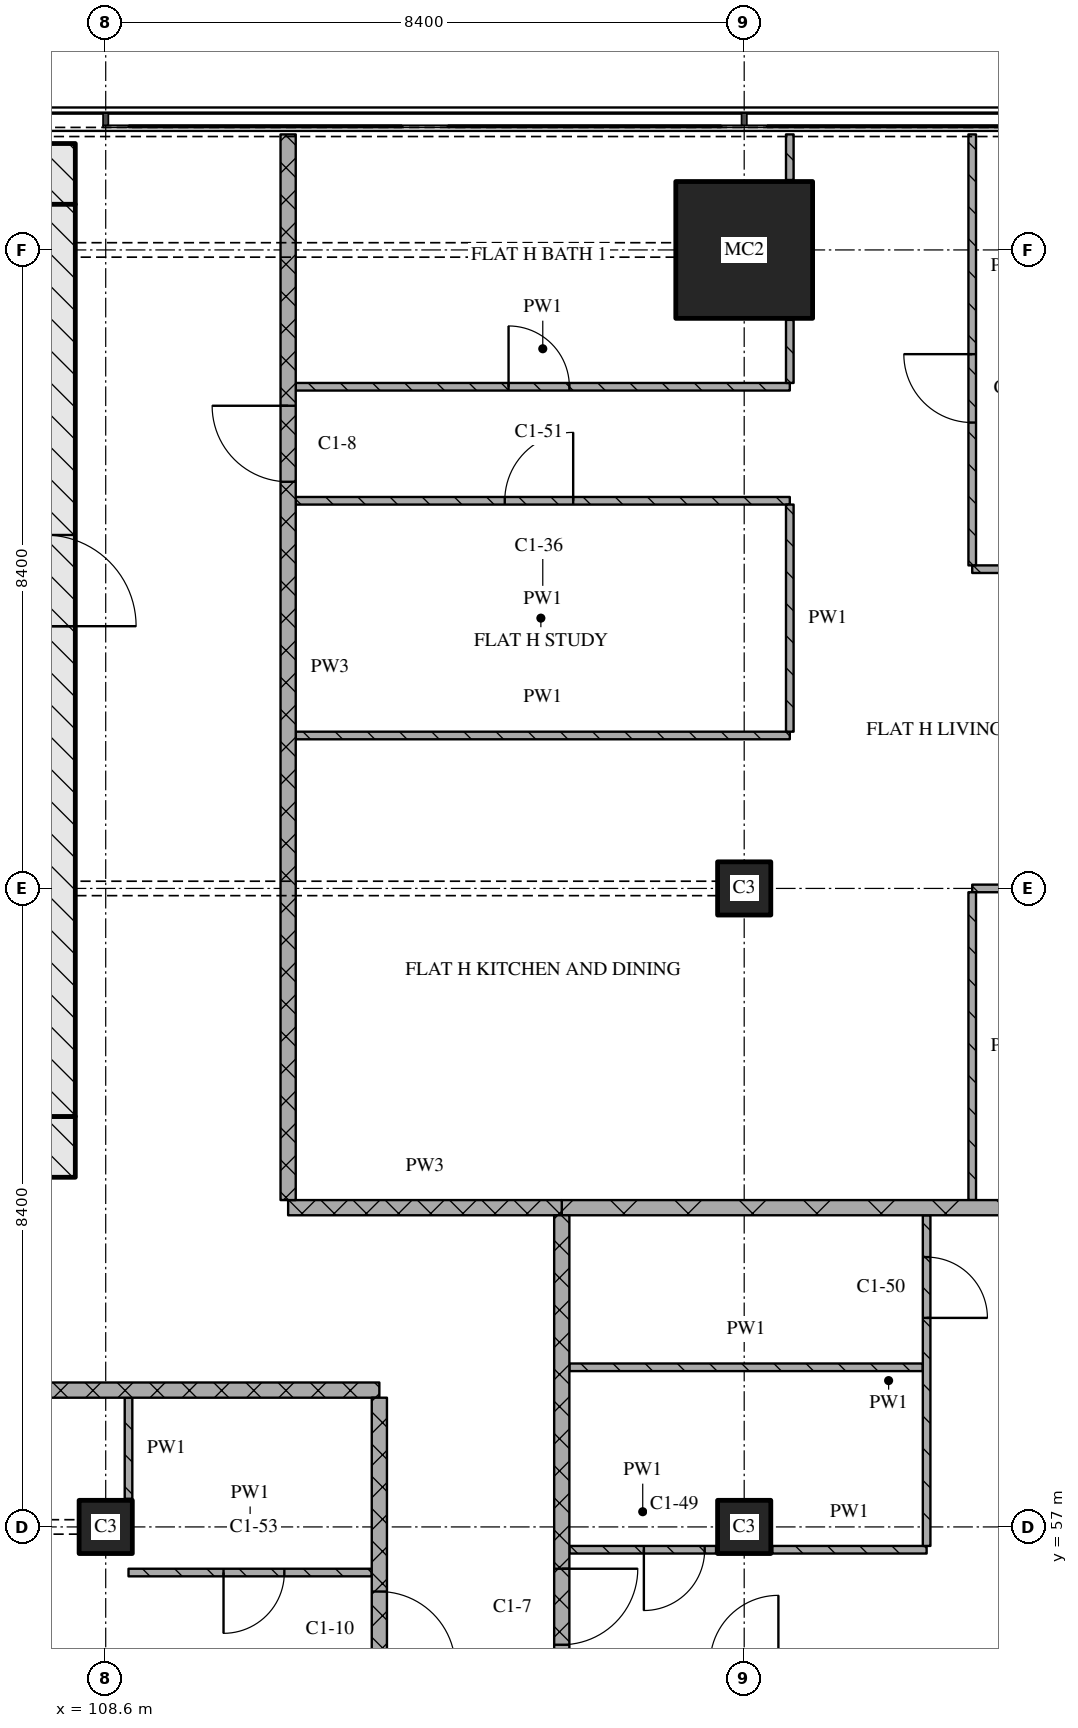
"""IFC4 building model, lengths in metres.
Left out: names, types, materials, properties, quantities, classifications, styles, units other than length and angle.
Written with IfcOpenShell. Run it as: python <this file> out.ifc"""

import sys

from ifc_helpers import new_model, si_unit, direction, frame, frame_2d, origin, origin_2d, place, context, subcontext, project, spatial, rectangle, extrude, element, fill, save


model = new_model("IFC4")
c1 = context("Model", 3, precision=1e-05, world=origin(), true_north=direction((0.0, 1.0)))
c2 = subcontext(c1, "Body", "Model", "MODEL_VIEW")
j1 = project(units=[si_unit("LENGTHUNIT", "METRE"), si_unit("PLANEANGLEUNIT", "RADIAN")], contexts=[c1])
p1 = place(None, origin())
s1 = spatial("IfcSite", under=j1, at=p1, CompositionType="ELEMENT")
p2 = place(p1, origin())
s2 = spatial("IfcBuilding", under=s1, at=p2, CompositionType="ELEMENT")
p3 = place(p2, frame((0.0, 0.0, 151.05)))
s3 = spatial("IfcBuildingStorey", under=s2, at=p3, CompositionType="ELEMENT", Elevation=151.05)
for number, where, z_axis, x_axis in (
    (1, (108.6, 57.0, 0.0), (0.0, 0.0, 1.0), (1.0, 0.0, 0.0)),
    (2, (117.0, 57.0, 0.0), (0.0, 0.0, 1.0), (1.0, 0.0, 0.0)),
    (3, (117.0, 65.4, 0.0), (0.0, 0.0, 1.0), (1.0, 0.0, 0.0)),
):
    element("IfcColumn", number, at=place(p3, frame(where, z_axis=z_axis, x_axis=x_axis)), inside=s3, PredefinedType="COLUMN", context=c2, shape_type="SweptSolid", body=[
        extrude(rectangle(XDim=0.7, YDim=0.7, at=origin_2d()), origin(), (0.0, 0.0, 1.0), 3.6),
    ])
p4 = place(p3, frame((117.0, 73.8, 0.0), z_axis=(0.0, 0.0, 1.0), x_axis=(1.0, 0.0, 0.0)))
e4 = element("IfcColumn", 4, at=p4, inside=s3, PredefinedType="COLUMN", context=c2, shape_type="SweptSolid", body=[
    extrude(rectangle(XDim=1.8, YDim=1.8, at=origin_2d()), origin(), (0.0, 0.0, 1.0), 3.6),
])
p5 = place(p3, frame((67.0, 62.0, 0.0), z_axis=(0.0, 0.0, 1.0), x_axis=(1.0, 0.0, 0.0)))
e5 = element("IfcWall", 5, at=p5, inside=s3, PredefinedType="SOLIDWALL", context=c2, shape_type="SweptSolid", body=[
    extrude(rectangle(XDim=41.2, YDim=0.8, at=frame_2d((20.6, 0.0))), origin(), (0.0, 0.0, 1.0), 3.32),
])
p6 = place(p5, frame((20.95, 0.0, 0.0)))
e6 = element("IfcOpeningElement", 6, at=p6, cuts=e5, PredefinedType="OPENING", context=c2, shape_type="SweptSolid", body=[
    extrude(rectangle(XDim=1.8, YDim=2.1, at=frame_2d((0.9, 1.05))), frame((0.0, 0.41, 0.0), z_axis=(0.0, -1.0, 0.0), x_axis=(1.0, 0.0, 0.0)), (0.0, 0.0, 1.0), 0.82),
])
p7 = place(p3, frame((67.0, 74.8, 0.0), z_axis=(0.0, 0.0, 1.0), x_axis=(1.0, 0.0, 0.0)))
e7 = element("IfcWall", 7, at=p7, inside=s3, PredefinedType="SOLIDWALL", context=c2, shape_type="SweptSolid", body=[
    extrude(rectangle(XDim=41.2, YDim=0.8, at=frame_2d((20.6, 0.0))), origin(), (0.0, 0.0, 1.0), 3.32),
])
p8 = place(p3, frame((107.8, 62.4, 0.0), z_axis=(0.0, 0.0, 1.0), x_axis=(0.0, 1.0, 0.0)))
e8 = element("IfcWall", 8, at=p8, inside=s3, PredefinedType="SOLIDWALL", context=c2, shape_type="SweptSolid", body=[
    extrude(rectangle(XDim=12.0, YDim=0.8, at=frame_2d((6.0, 0.0))), origin(), (0.0, 0.0, 1.0), 3.32),
])
p9 = place(p8, frame((6.45, 0.0, 0.0)))
e9 = element("IfcOpeningElement", 9, at=p9, cuts=e8, PredefinedType="OPENING", context=c2, shape_type="SweptSolid", body=[
    extrude(rectangle(XDim=1.2, YDim=2.1, at=frame_2d((0.6, 1.05))), frame((0.0, 0.41, 0.0), z_axis=(0.0, -1.0, 0.0), x_axis=(1.0, 0.0, 0.0)), (0.0, 0.0, 1.0), 0.82),
])
p10 = place(p3, frame((108.9, 56.4, 0.0), z_axis=(0.0, 0.0, 1.0), x_axis=(1.0, 0.0, 0.0)))
e10 = element("IfcWall", 10, at=p10, inside=s3, PredefinedType="PARTITIONING", context=c2, shape_type="SweptSolid", body=[
    extrude(rectangle(XDim=3.2, YDim=0.1, at=frame_2d((1.6, 0.0))), origin(), (0.0, 0.0, 1.0), 3.32),
])
p11 = place(p10, frame((1.25, 0.0, 0.0)))
e11 = element("IfcOpeningElement", 11, at=p11, cuts=e10, PredefinedType="OPENING", context=c2, shape_type="SweptSolid", body=[
    extrude(rectangle(XDim=0.8, YDim=2.1, at=frame_2d((0.4, 1.05))), frame((0.0, 0.06, 0.0), z_axis=(0.0, -1.0, 0.0), x_axis=(1.0, 0.0, 0.0)), (0.0, 0.0, 1.0), 0.12),
])
p12 = place(p3, frame((114.7, 56.7, 0.0), z_axis=(0.0, 0.0, 1.0), x_axis=(1.0, 0.0, 0.0)))
e12 = element("IfcWall", 12, at=p12, inside=s3, PredefinedType="PARTITIONING", context=c2, shape_type="SweptSolid", body=[
    extrude(rectangle(XDim=1.93, YDim=0.1, at=frame_2d((0.965, 0.0))), origin(), (0.0, 0.0, 1.0), 3.32),
])
p13 = place(p12, frame((0.98, 0.0, 0.0)))
e13 = element("IfcOpeningElement", 13, at=p13, cuts=e12, PredefinedType="OPENING", context=c2, shape_type="SweptSolid", body=[
    extrude(rectangle(XDim=0.8, YDim=2.1, at=frame_2d((0.4, 1.05))), frame((0.0, 0.06, 0.0), z_axis=(0.0, -1.0, 0.0), x_axis=(1.0, 0.0, 0.0)), (0.0, 0.0, 1.0), 0.12),
])
p14 = place(p3, frame((117.37, 56.7, 0.0), z_axis=(0.0, 0.0, 1.0), x_axis=(1.0, 0.0, 0.0)))
e14 = element("IfcWall", 14, at=p14, inside=s3, PredefinedType="PARTITIONING", context=c2, shape_type="SweptSolid", body=[
    extrude(rectangle(XDim=2.03, YDim=0.1, at=frame_2d((1.015, 0.0))), origin(), (0.0, 0.0, 1.0), 3.32),
])
p15 = place(p3, frame((101.4, 58.8, 0.0), z_axis=(0.0, 0.0, 1.0), x_axis=(1.0, 0.0, 0.0)))
e15 = element("IfcWall", 15, at=p15, inside=s3, PredefinedType="PARTITIONING", context=c2, shape_type="SweptSolid", body=[
    extrude(rectangle(XDim=10.8, YDim=0.2, at=frame_2d((5.4, 0.0))), origin(), (0.0, 0.0, 1.0), 3.32),
])
p16 = place(p3, frame((114.7, 59.1, 0.0), z_axis=(0.0, 0.0, 1.0), x_axis=(1.0, 0.0, 0.0)))
e16 = element("IfcWall", 16, at=p16, inside=s3, PredefinedType="PARTITIONING", context=c2, shape_type="SweptSolid", body=[
    extrude(rectangle(XDim=4.65, YDim=0.1, at=frame_2d((2.325, 0.0))), origin(), (0.0, 0.0, 1.0), 3.32),
])
p17 = place(p3, frame((111.0, 61.2, 0.0), z_axis=(0.0, 0.0, 1.0), x_axis=(1.0, 0.0, 0.0)))
e17 = element("IfcWall", 17, at=p17, inside=s3, PredefinedType="PARTITIONING", context=c2, shape_type="SweptSolid", body=[
    extrude(rectangle(XDim=3.6, YDim=0.2, at=frame_2d((1.8, 0.0))), origin(), (0.0, 0.0, 1.0), 3.32),
])
p18 = place(p3, frame((114.6, 61.2, 0.0), z_axis=(0.0, 0.0, 1.0), x_axis=(1.0, 0.0, 0.0)))
e18 = element("IfcWall", 18, at=p18, inside=s3, PredefinedType="PARTITIONING", context=c2, shape_type="SweptSolid", body=[
    extrude(rectangle(XDim=12.32, YDim=0.2, at=frame_2d((6.16, 0.0))), origin(), (0.0, 0.0, 1.0), 3.32),
])
p19 = place(p3, frame((124.48, 65.4, 0.0), z_axis=(0.0, 0.0, 1.0), x_axis=(-1.0, 0.0, 0.0)))
e19 = element("IfcWall", 19, at=p19, inside=s3, PredefinedType="PARTITIONING", context=c2, shape_type="SweptSolid", body=[
    extrude(rectangle(XDim=4.48, YDim=0.1, at=frame_2d((2.24, 0.0))), origin(), (0.0, 0.0, 1.0), 3.32),
])
p20 = place(p19, frame((0.43, 0.0, 0.0)))
e20 = element("IfcOpeningElement", 20, at=p20, cuts=e19, PredefinedType="OPENING", context=c2, shape_type="SweptSolid", body=[
    extrude(rectangle(XDim=0.9, YDim=2.1, at=frame_2d((0.45, 1.05))), frame((0.0, 0.06, 0.0), z_axis=(0.0, -1.0, 0.0), x_axis=(1.0, 0.0, 0.0)), (0.0, 0.0, 1.0), 0.12),
])
p21 = place(p3, frame((111.1, 67.412, 0.0), z_axis=(0.0, 0.0, 1.0), x_axis=(1.0, 0.0, 0.0)))
e21 = element("IfcWall", 21, at=p21, inside=s3, PredefinedType="PARTITIONING", context=c2, shape_type="SweptSolid", body=[
    extrude(rectangle(XDim=6.5, YDim=0.1, at=frame_2d((3.25, 0.0))), origin(), (0.0, 0.0, 1.0), 3.32),
])
p22 = place(p3, frame((120.0, 69.6, 0.0), z_axis=(0.0, 0.0, 1.0), x_axis=(1.0, 0.0, 0.0)))
e22 = element("IfcWall", 22, at=p22, inside=s3, PredefinedType="PARTITIONING", context=c2, shape_type="SweptSolid", body=[
    extrude(rectangle(XDim=6.92, YDim=0.1, at=frame_2d((3.46, 0.0))), origin(), (0.0, 0.0, 1.0), 3.32),
])
p23 = place(p3, frame((117.6, 70.5, 0.0), z_axis=(0.0, 0.0, 1.0), x_axis=(-1.0, 0.0, 0.0)))
e23 = element("IfcWall", 23, at=p23, inside=s3, PredefinedType="PARTITIONING", context=c2, shape_type="SweptSolid", body=[
    extrude(rectangle(XDim=6.5, YDim=0.1, at=frame_2d((3.25, 0.0))), origin(), (0.0, 0.0, 1.0), 3.32),
])
p24 = place(p23, frame((2.85, 0.0, 0.0)))
e24 = element("IfcOpeningElement", 24, at=p24, cuts=e23, PredefinedType="OPENING", context=c2, shape_type="SweptSolid", body=[
    extrude(rectangle(XDim=0.9, YDim=2.1, at=frame_2d((0.45, 1.05))), frame((0.0, 0.06, 0.0), z_axis=(0.0, -1.0, 0.0), x_axis=(1.0, 0.0, 0.0)), (0.0, 0.0, 1.0), 0.12),
])
p25 = place(p3, frame((111.1, 72.0, 0.0), z_axis=(0.0, 0.0, 1.0), x_axis=(1.0, 0.0, 0.0)))
e25 = element("IfcWall", 25, at=p25, inside=s3, PredefinedType="PARTITIONING", context=c2, shape_type="SweptSolid", body=[
    extrude(rectangle(XDim=6.5, YDim=0.1, at=frame_2d((3.25, 0.0))), origin(), (0.0, 0.0, 1.0), 3.32),
])
p26 = place(p25, frame((2.8, 0.0, 0.0)))
e26 = element("IfcOpeningElement", 26, at=p26, cuts=e25, PredefinedType="OPENING", context=c2, shape_type="SweptSolid", body=[
    extrude(rectangle(XDim=0.8, YDim=2.1, at=frame_2d((0.4, 1.05))), frame((0.0, 0.06, 0.0), z_axis=(0.0, -1.0, 0.0), x_axis=(1.0, 0.0, 0.0)), (0.0, 0.0, 1.0), 0.12),
])
p27 = place(p3, frame((108.9, 58.7, 0.0), z_axis=(0.0, 0.0, 1.0), x_axis=(0.0, -1.0, 0.0)))
e27 = element("IfcWall", 27, at=p27, inside=s3, PredefinedType="PARTITIONING", context=c2, shape_type="SweptSolid", body=[
    extrude(rectangle(XDim=1.33, YDim=0.1, at=frame_2d((0.665, 0.0))), origin(), (0.0, 0.0, 1.0), 3.32),
])
p28 = place(p3, frame((111.0, 75.32, 0.0), z_axis=(0.0, 0.0, 1.0), x_axis=(0.0, -1.0, 0.0)))
e28 = element("IfcWall", 28, at=p28, inside=s3, PredefinedType="PARTITIONING", context=c2, shape_type="SweptSolid", body=[
    extrude(rectangle(XDim=14.02, YDim=0.2, at=frame_2d((7.01, 0.0))), origin(), (0.0, 0.0, 1.0), 3.32),
])
p29 = place(p28, frame((3.57, 0.0, 0.0)))
e29 = element("IfcOpeningElement", 29, at=p29, cuts=e28, PredefinedType="OPENING", context=c2, shape_type="SweptSolid", body=[
    extrude(rectangle(XDim=1.0, YDim=2.1, at=frame_2d((0.5, 1.05))), frame((0.0, 0.11, 0.0), z_axis=(0.0, -1.0, 0.0), x_axis=(1.0, 0.0, 0.0)), (0.0, 0.0, 1.0), 0.22),
])
p30 = place(p3, frame((112.2, 43.3, 0.0), z_axis=(0.0, 0.0, 1.0), x_axis=(0.0, 1.0, 0.0)))
e30 = element("IfcWall", 30, at=p30, inside=s3, PredefinedType="PARTITIONING", context=c2, shape_type="SweptSolid", body=[
    extrude(rectangle(XDim=15.4, YDim=0.2, at=frame_2d((7.7, 0.0))), origin(), (0.0, 0.0, 1.0), 3.32),
])
p31 = place(p30, frame((11.85, 0.0, 0.0)))
e31 = element("IfcOpeningElement", 31, at=p31, cuts=e30, PredefinedType="OPENING", context=c2, shape_type="SweptSolid", body=[
    extrude(rectangle(XDim=1.0, YDim=2.1, at=frame_2d((0.5, 1.05))), frame((0.0, 0.11, 0.0), z_axis=(0.0, -1.0, 0.0), x_axis=(1.0, 0.0, 0.0)), (0.0, 0.0, 1.0), 0.22),
])
p32 = place(p3, frame((114.6, 61.1, 0.0), z_axis=(0.0, 0.0, 1.0), x_axis=(0.0, -1.0, 0.0)))
e32 = element("IfcWall", 32, at=p32, inside=s3, PredefinedType="PARTITIONING", context=c2, shape_type="SweptSolid", body=[
    extrude(rectangle(XDim=17.8, YDim=0.2, at=frame_2d((8.9, 0.0))), origin(), (0.0, 0.0, 1.0), 3.32),
])
p33 = place(p32, frame((4.65, 0.0, 0.0)))
e33 = element("IfcOpeningElement", 33, at=p33, cuts=e32, PredefinedType="OPENING", context=c2, shape_type="SweptSolid", body=[
    extrude(rectangle(XDim=1.0, YDim=2.1, at=frame_2d((0.5, 1.05))), frame((0.0, 0.11, 0.0), z_axis=(0.0, -1.0, 0.0), x_axis=(1.0, 0.0, 0.0)), (0.0, 0.0, 1.0), 0.22),
])
p34 = place(p3, frame((117.6, 70.45, 0.0), z_axis=(0.0, 0.0, 1.0), x_axis=(0.0, -1.0, 0.0)))
e34 = element("IfcWall", 34, at=p34, inside=s3, PredefinedType="PARTITIONING", context=c2, shape_type="SweptSolid", body=[
    extrude(rectangle(XDim=2.988, YDim=0.1, at=frame_2d((1.494, 0.0))), origin(), (0.0, 0.0, 1.0), 3.32),
])
p35 = place(p3, frame((117.6, 72.88, 0.0), z_axis=(0.0, 0.0, 1.0), x_axis=(0.0, -1.0, 0.0)))
e35 = element("IfcWall", 35, at=p35, inside=s3, PredefinedType="PARTITIONING", context=c2, shape_type="SweptSolid", body=[
    extrude(rectangle(XDim=0.83, YDim=0.1, at=frame_2d((0.415, 0.0))), origin(), (0.0, 0.0, 1.0), 3.32),
])
p36 = place(p3, frame((117.6, 75.32, 0.0), z_axis=(0.0, 0.0, 1.0), x_axis=(0.0, -1.0, 0.0)))
e36 = element("IfcWall", 36, at=p36, inside=s3, PredefinedType="PARTITIONING", context=c2, shape_type="SweptSolid", body=[
    extrude(rectangle(XDim=0.6, YDim=0.1, at=frame_2d((0.3, 0.0))), origin(), (0.0, 0.0, 1.0), 3.32),
])
p37 = place(p3, frame((119.4, 56.75, 0.0), z_axis=(0.0, 0.0, 1.0), x_axis=(0.0, 1.0, 0.0)))
e37 = element("IfcWall", 37, at=p37, inside=s3, PredefinedType="PARTITIONING", context=c2, shape_type="SweptSolid", body=[
    extrude(rectangle(XDim=4.35, YDim=0.1, at=frame_2d((2.175, 0.0))), origin(), (0.0, 0.0, 1.0), 3.32),
])
p38 = place(p37, frame((3.0, 0.0, 0.0)))
e38 = element("IfcOpeningElement", 38, at=p38, cuts=e37, PredefinedType="OPENING", context=c2, shape_type="SweptSolid", body=[
    extrude(rectangle(XDim=0.8, YDim=2.1, at=frame_2d((0.4, 1.05))), frame((0.0, 0.06, 0.0), z_axis=(0.0, -1.0, 0.0), x_axis=(1.0, 0.0, 0.0)), (0.0, 0.0, 1.0), 0.12),
])
p39 = place(p3, frame((120.0, 65.35, 0.0), z_axis=(0.0, 0.0, 1.0), x_axis=(0.0, -1.0, 0.0)))
e39 = element("IfcWall", 39, at=p39, inside=s3, PredefinedType="PARTITIONING", context=c2, shape_type="SweptSolid", body=[
    extrude(rectangle(XDim=4.05, YDim=0.1, at=frame_2d((2.025, 0.0))), origin(), (0.0, 0.0, 1.0), 3.32),
])
p40 = place(p3, frame((120.0, 75.32, 0.0), z_axis=(0.0, 0.0, 1.0), x_axis=(0.0, -1.0, 0.0)))
e40 = element("IfcWall", 40, at=p40, inside=s3, PredefinedType="PARTITIONING", context=c2, shape_type="SweptSolid", body=[
    extrude(rectangle(XDim=5.67, YDim=0.1, at=frame_2d((2.835, 0.0))), origin(), (0.0, 0.0, 1.0), 3.32),
])
p41 = place(p40, frame((2.891, 0.0, 0.0)))
e41 = element("IfcOpeningElement", 41, at=p41, cuts=e40, PredefinedType="OPENING", context=c2, shape_type="SweptSolid", body=[
    extrude(rectangle(XDim=0.9, YDim=2.1, at=frame_2d((0.45, 1.05))), frame((0.0, 0.06, 0.0), z_axis=(0.0, -1.0, 0.0), x_axis=(1.0, 0.0, 0.0)), (0.0, 0.0, 1.0), 0.12),
])
p42 = place(p11, origin())
e42 = element("IfcDoor", 42, at=p42, inside=s3, OperationType="SINGLE_SWING_RIGHT", PredefinedType="DOOR", context=c2, shape_type="SweptSolid", body=[
    extrude(rectangle(XDim=0.8, YDim=2.1, at=frame_2d((0.4, 1.05))), frame((0.0, 0.025, 0.0), z_axis=(0.0, -1.0, 0.0), x_axis=(1.0, 0.0, 0.0)), (0.0, 0.0, 1.0), 0.05),
])
fill(e11, e42)
p43 = place(p13, origin())
e43 = element("IfcDoor", 43, at=p43, inside=s3, OperationType="SINGLE_SWING_RIGHT", PredefinedType="DOOR", context=c2, shape_type="SweptSolid", body=[
    extrude(rectangle(XDim=0.8, YDim=2.1, at=frame_2d((0.4, 1.05))), frame((0.0, 0.025, 0.0), z_axis=(0.0, -1.0, 0.0), x_axis=(1.0, 0.0, 0.0)), (0.0, 0.0, 1.0), 0.05),
])
fill(e13, e43)
p44 = place(p24, origin())
e44 = element("IfcDoor", 44, at=p44, inside=s3, OperationType="SINGLE_SWING_RIGHT", PredefinedType="DOOR", context=c2, shape_type="SweptSolid", body=[
    extrude(rectangle(XDim=0.9, YDim=2.1, at=frame_2d((0.45, 1.05))), frame((0.0, 0.025, 0.0), z_axis=(0.0, -1.0, 0.0), x_axis=(1.0, 0.0, 0.0)), (0.0, 0.0, 1.0), 0.05),
])
fill(e24, e44)
p45 = place(p26, origin())
e45 = element("IfcDoor", 45, at=p45, inside=s3, OperationType="SINGLE_SWING_LEFT", PredefinedType="DOOR", context=c2, shape_type="SweptSolid", body=[
    extrude(rectangle(XDim=0.8, YDim=2.1, at=frame_2d((0.4, 1.05))), frame((0.0, 0.025, 0.0), z_axis=(0.0, -1.0, 0.0), x_axis=(1.0, 0.0, 0.0)), (0.0, 0.0, 1.0), 0.05),
])
fill(e26, e45)
p46 = place(p29, origin())
e46 = element("IfcDoor", 46, at=p46, inside=s3, OperationType="SINGLE_SWING_RIGHT", PredefinedType="DOOR", context=c2, shape_type="SweptSolid", body=[
    extrude(rectangle(XDim=1.0, YDim=2.1, at=frame_2d((0.5, 1.05))), frame((0.0, 0.025, 0.0), z_axis=(0.0, -1.0, 0.0), x_axis=(1.0, 0.0, 0.0)), (0.0, 0.0, 1.0), 0.05),
])
fill(e29, e46)
p47 = place(p31, origin())
e47 = element("IfcDoor", 47, at=p47, inside=s3, OperationType="SINGLE_SWING_RIGHT", PredefinedType="DOOR", context=c2, shape_type="SweptSolid", body=[
    extrude(rectangle(XDim=1.0, YDim=2.1, at=frame_2d((0.5, 1.05))), frame((0.0, 0.025, 0.0), z_axis=(0.0, -1.0, 0.0), x_axis=(1.0, 0.0, 0.0)), (0.0, 0.0, 1.0), 0.05),
])
fill(e31, e47)
p48 = place(p33, origin())
e48 = element("IfcDoor", 48, at=p48, inside=s3, OperationType="SINGLE_SWING_LEFT", PredefinedType="DOOR", context=c2, shape_type="SweptSolid", body=[
    extrude(rectangle(XDim=1.0, YDim=2.1, at=frame_2d((0.5, 1.05))), frame((0.0, 0.025, 0.0), z_axis=(0.0, -1.0, 0.0), x_axis=(1.0, 0.0, 0.0)), (0.0, 0.0, 1.0), 0.05),
])
fill(e33, e48)
p49 = place(p38, origin())
e49 = element("IfcDoor", 49, at=p49, inside=s3, OperationType="SINGLE_SWING_RIGHT", PredefinedType="DOOR", context=c2, shape_type="SweptSolid", body=[
    extrude(rectangle(XDim=0.8, YDim=2.1, at=frame_2d((0.4, 1.05))), frame((0.0, 0.025, 0.0), z_axis=(0.0, -1.0, 0.0), x_axis=(1.0, 0.0, 0.0)), (0.0, 0.0, 1.0), 0.05),
])
fill(e38, e49)
p50 = place(p41, origin())
e50 = element("IfcDoor", 50, at=p50, inside=s3, OperationType="SINGLE_SWING_RIGHT", PredefinedType="DOOR", context=c2, shape_type="SweptSolid", body=[
    extrude(rectangle(XDim=0.9, YDim=2.1, at=frame_2d((0.45, 1.05))), frame((0.0, 0.025, 0.0), z_axis=(0.0, -1.0, 0.0), x_axis=(1.0, 0.0, 0.0)), (0.0, 0.0, 1.0), 0.05),
])
fill(e41, e50)
save(model, sys.argv[1])
